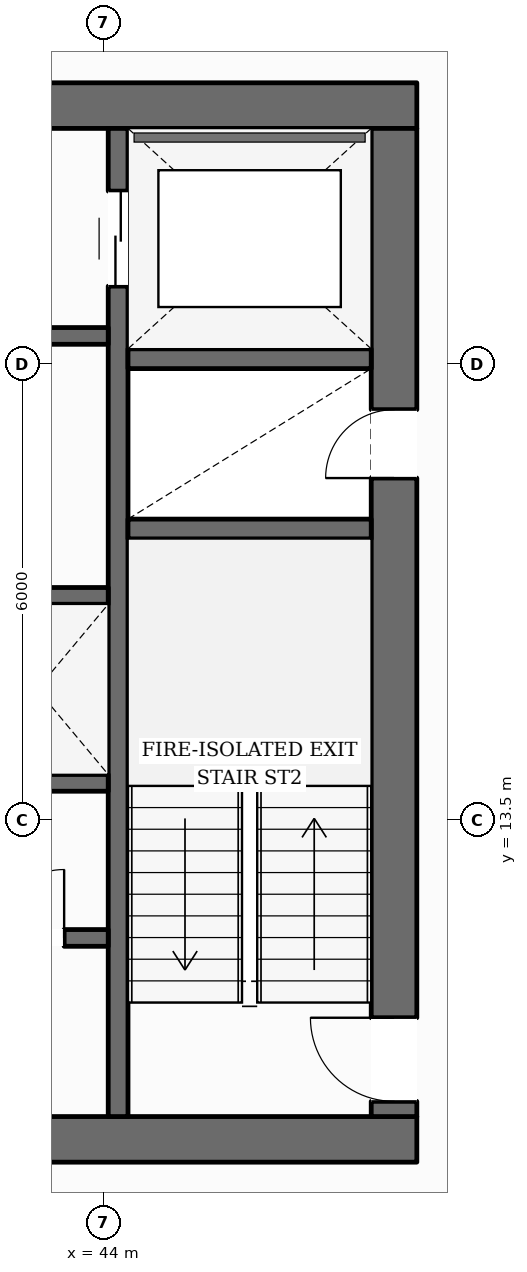
"""IFC4 building model, lengths in metres.
Left out: names, types, materials, properties, quantities, classifications, styles, units other than length and angle.
Written with IfcOpenShell. Run it as: python <this file> out.ifc"""

import sys

from ifc_helpers import new_model, si_unit, direction, frame, frame_2d, origin, place, context, subcontext, project, spatial, rectangle, extrude, element, fill, save


model = new_model("IFC4")
c1 = context("Model", 3, precision=1e-05, world=origin(), true_north=direction((0.0, 1.0)))
c2 = subcontext(c1, "Body", "Model", "MODEL_VIEW")
j1 = project(units=[si_unit("LENGTHUNIT", "METRE"), si_unit("PLANEANGLEUNIT", "RADIAN")], contexts=[c1])
p1 = place(None, origin())
s1 = spatial("IfcSite", under=j1, at=p1, CompositionType="ELEMENT")
p2 = place(p1, origin())
s2 = spatial("IfcBuilding", under=s1, at=p2, CompositionType="ELEMENT")
p3 = place(p2, frame((0.0, 0.0, 6.0)))
s3 = spatial("IfcBuildingStorey", under=s2, at=p3, CompositionType="ELEMENT", Elevation=6.0)
p4 = place(p3, frame((27.88, 9.3, 0.0), z_axis=(0.0, 0.0, 1.0), x_axis=(1.0, 0.0, 0.0)))
e1 = element("IfcWall", 1, at=p4, inside=s3, PredefinedType="SOLIDWALL", context=c2, shape_type="SweptSolid", body=[
    extrude(rectangle(XDim=20.24, YDim=0.6, at=frame_2d((10.12, 0.0))), origin(), (0.0, 0.0, 1.0), 3.59),
])
p5 = place(p4, frame((10.62, 0.0, 0.0)))
e2 = element("IfcOpeningElement", 2, at=p5, cuts=e1, PredefinedType="OPENING", context=c2, shape_type="SweptSolid", body=[
    extrude(rectangle(XDim=1.4, YDim=2.2, at=frame_2d((0.7, 1.1))), frame((0.0, 0.31, 0.0), z_axis=(0.0, -1.0, 0.0), x_axis=(1.0, 0.0, 0.0)), (0.0, 0.0, 1.0), 0.62),
])
p6 = place(p3, frame((27.88, 22.9, 0.0), z_axis=(0.0, 0.0, 1.0), x_axis=(1.0, 0.0, 0.0)))
e3 = element("IfcWall", 3, at=p6, inside=s3, PredefinedType="SOLIDWALL", context=c2, shape_type="SweptSolid", body=[
    extrude(rectangle(XDim=20.24, YDim=0.6, at=frame_2d((10.12, 0.0))), origin(), (0.0, 0.0, 1.0), 3.59),
])
p7 = place(p6, frame((6.395, 0.0, 0.0)))
e4 = element("IfcOpeningElement", 4, at=p7, cuts=e3, PredefinedType="OPENING", context=c2, shape_type="SweptSolid", body=[
    extrude(rectangle(XDim=1.05, YDim=2.15, at=frame_2d((0.525, 1.075))), frame((0.0, 0.31, 0.0), z_axis=(0.0, -1.0, 0.0), x_axis=(1.0, 0.0, 0.0)), (0.0, 0.0, 1.0), 0.62),
])
p8 = place(p6, frame((12.795, 0.0, 0.0)))
e5 = element("IfcOpeningElement", 5, at=p8, cuts=e3, PredefinedType="OPENING", context=c2, shape_type="SweptSolid", body=[
    extrude(rectangle(XDim=1.05, YDim=2.15, at=frame_2d((0.525, 1.075))), frame((0.0, 0.31, 0.0), z_axis=(0.0, -1.0, 0.0), x_axis=(1.0, 0.0, 0.0)), (0.0, 0.0, 1.0), 0.62),
])
p9 = place(p3, frame((47.82, 9.6, 0.0), z_axis=(0.0, 0.0, 1.0), x_axis=(0.0, 1.0, 0.0)))
e6 = element("IfcWall", 6, at=p9, inside=s3, PredefinedType="SOLIDWALL", context=c2, shape_type="SweptSolid", body=[
    extrude(rectangle(XDim=13.0, YDim=0.6, at=frame_2d((6.5, 0.0))), origin(), (0.0, 0.0, 1.0), 3.59),
])
p10 = place(p9, frame((0.2, 0.0, 0.0)))
e7 = element("IfcOpeningElement", 7, at=p10, cuts=e6, PredefinedType="OPENING", context=c2, shape_type="SweptSolid", body=[
    extrude(rectangle(XDim=1.1, YDim=2.15, at=frame_2d((0.55, 1.075))), frame((0.0, 0.31, 0.0), z_axis=(0.0, -1.0, 0.0), x_axis=(1.0, 0.0, 0.0)), (0.0, 0.0, 1.0), 0.62),
])
p11 = place(p9, frame((8.4, 0.0, 0.0)))
e8 = element("IfcOpeningElement", 8, at=p11, cuts=e6, PredefinedType="OPENING", context=c2, shape_type="SweptSolid", body=[
    extrude(rectangle(XDim=0.9, YDim=2.1, at=frame_2d((0.45, 1.05))), frame((0.0, 0.31, 0.0), z_axis=(0.0, -1.0, 0.0), x_axis=(1.0, 0.0, 0.0)), (0.0, 0.0, 1.0), 0.62),
])
p12 = place(p3, frame((44.19, 9.6, 0.0), z_axis=(0.0, 0.0, 1.0), x_axis=(0.0, 1.0, 0.0)))
e9 = element("IfcWall", 9, at=p12, inside=s3, PredefinedType="SHEAR", context=c2, shape_type="SweptSolid", body=[
    extrude(rectangle(XDim=13.0, YDim=0.26, at=frame_2d((6.5, 0.0))), origin(), (0.0, 0.0, 1.0), 3.59),
])
p13 = place(p12, frame((10.925, 0.0, 0.0)))
e10 = element("IfcOpeningElement", 10, at=p13, cuts=e9, PredefinedType="OPENING", context=c2, shape_type="SweptSolid", body=[
    extrude(rectangle(XDim=1.25, YDim=2.25, at=frame_2d((0.625, 1.125))), frame((0.0, 0.14, 0.0), z_axis=(0.0, -1.0, 0.0), x_axis=(1.0, 0.0, 0.0)), (0.0, 0.0, 1.0), 0.28),
])
for number, where, z_axis, x_axis in (
    (11, (44.32, 17.33, 0.0), (0.0, 0.0, 1.0), (1.0, 0.0, 0.0)),
    (12, (44.32, 19.57, 0.0), (0.0, 0.0, 1.0), (1.0, 0.0, 0.0)),
):
    element("IfcWall", number, at=place(p3, frame(where, z_axis=z_axis, x_axis=x_axis)), inside=s3, PredefinedType="SHEAR", context=c2, shape_type="SweptSolid", body=[
        extrude(rectangle(XDim=3.2, YDim=0.26, at=frame_2d((1.6, 0.0))), origin(), (0.0, 0.0, 1.0), 3.59),
    ])
p14 = place(p3, frame((31.94, 19.87, 0.0), z_axis=(0.0, 0.0, 1.0), x_axis=(1.0, 0.0, 0.0)))
e13 = element("IfcWall", 13, at=p14, inside=s3, PredefinedType="SOLIDWALL", context=c2, shape_type="SweptSolid", body=[
    extrude(rectangle(XDim=12.12, YDim=0.22, at=frame_2d((6.06, 0.0))), origin(), (0.0, 0.0, 1.0), 3.59),
])
p15 = place(p14, frame((6.3, 0.0, 0.0)))
e14 = element("IfcOpeningElement", 14, at=p15, cuts=e13, PredefinedType="OPENING", context=c2, shape_type="SweptSolid", body=[
    extrude(rectangle(XDim=1.1, YDim=2.15, at=frame_2d((0.55, 1.075))), frame((0.0, 0.12, 0.0), z_axis=(0.0, -1.0, 0.0), x_axis=(1.0, 0.0, 0.0)), (0.0, 0.0, 1.0), 0.24),
])
p16 = place(p14, frame((8.01, 0.0, 0.0)))
e15 = element("IfcOpeningElement", 15, at=p16, cuts=e13, PredefinedType="OPENING", context=c2, shape_type="SweptSolid", body=[
    extrude(rectangle(XDim=0.9, YDim=2.1, at=frame_2d((0.45, 1.05))), frame((0.0, 0.12, 0.0), z_axis=(0.0, -1.0, 0.0), x_axis=(1.0, 0.0, 0.0)), (0.0, 0.0, 1.0), 0.24),
])
p17 = place(p14, frame((10.21, 0.0, 0.0)))
e16 = element("IfcOpeningElement", 16, at=p17, cuts=e13, PredefinedType="OPENING", context=c2, shape_type="SweptSolid", body=[
    extrude(rectangle(XDim=0.9, YDim=2.1, at=frame_2d((0.45, 1.05))), frame((0.0, 0.12, 0.0), z_axis=(0.0, -1.0, 0.0), x_axis=(1.0, 0.0, 0.0)), (0.0, 0.0, 1.0), 0.24),
])
p18 = place(p3, frame((31.94, 16.45, 0.0), z_axis=(0.0, 0.0, 1.0), x_axis=(1.0, 0.0, 0.0)))
e17 = element("IfcWall", 17, at=p18, inside=s3, PredefinedType="SOLIDWALL", context=c2, shape_type="SweptSolid", body=[
    extrude(rectangle(XDim=12.12, YDim=0.22, at=frame_2d((6.06, 0.0))), origin(), (0.0, 0.0, 1.0), 3.59),
])
p19 = place(p3, frame((31.94, 13.99, 0.0), z_axis=(0.0, 0.0, 1.0), x_axis=(1.0, 0.0, 0.0)))
e18 = element("IfcWall", 18, at=p19, inside=s3, PredefinedType="SOLIDWALL", context=c2, shape_type="SweptSolid", body=[
    extrude(rectangle(XDim=12.12, YDim=0.22, at=frame_2d((6.06, 0.0))), origin(), (0.0, 0.0, 1.0), 3.59),
])
p20 = place(p19, frame((0.385, 0.0, 0.0)))
e19 = element("IfcOpeningElement", 19, at=p20, cuts=e18, PredefinedType="OPENING", context=c2, shape_type="SweptSolid", body=[
    extrude(rectangle(XDim=1.1, YDim=2.2, at=frame_2d((0.55, 1.1))), frame((0.0, 0.12, 0.0), z_axis=(0.0, -1.0, 0.0), x_axis=(1.0, 0.0, 0.0)), (0.0, 0.0, 1.0), 0.24),
])
p21 = place(p19, frame((2.435, 0.0, 0.0)))
e20 = element("IfcOpeningElement", 20, at=p21, cuts=e18, PredefinedType="OPENING", context=c2, shape_type="SweptSolid", body=[
    extrude(rectangle(XDim=1.1, YDim=2.2, at=frame_2d((0.55, 1.1))), frame((0.0, 0.12, 0.0), z_axis=(0.0, -1.0, 0.0), x_axis=(1.0, 0.0, 0.0)), (0.0, 0.0, 1.0), 0.24),
])
p22 = place(p19, frame((4.485, 0.0, 0.0)))
e21 = element("IfcOpeningElement", 21, at=p22, cuts=e18, PredefinedType="OPENING", context=c2, shape_type="SweptSolid", body=[
    extrude(rectangle(XDim=1.1, YDim=2.2, at=frame_2d((0.55, 1.1))), frame((0.0, 0.12, 0.0), z_axis=(0.0, -1.0, 0.0), x_axis=(1.0, 0.0, 0.0)), (0.0, 0.0, 1.0), 0.24),
])
p23 = place(p3, frame((40.28, 11.95, 0.0), z_axis=(0.0, 0.0, 1.0), x_axis=(1.0, 0.0, 0.0)))
e22 = element("IfcWall", 22, at=p23, inside=s3, PredefinedType="SOLIDWALL", context=c2, shape_type="SweptSolid", body=[
    extrude(rectangle(XDim=3.78, YDim=0.22, at=frame_2d((1.89, 0.0))), origin(), (0.0, 0.0, 1.0), 3.59),
])
p24 = place(p23, frame((0.47, 0.0, 0.0)))
e23 = element("IfcOpeningElement", 23, at=p24, cuts=e22, PredefinedType="OPENING", context=c2, shape_type="SweptSolid", body=[
    extrude(rectangle(XDim=0.9, YDim=2.1, at=frame_2d((0.45, 1.05))), frame((0.0, 0.12, 0.0), z_axis=(0.0, -1.0, 0.0), x_axis=(1.0, 0.0, 0.0)), (0.0, 0.0, 1.0), 0.24),
])
p25 = place(p23, frame((2.3, 0.0, 0.0)))
e24 = element("IfcOpeningElement", 24, at=p25, cuts=e22, PredefinedType="OPENING", context=c2, shape_type="SweptSolid", body=[
    extrude(rectangle(XDim=0.9, YDim=2.1, at=frame_2d((0.45, 1.05))), frame((0.0, 0.12, 0.0), z_axis=(0.0, -1.0, 0.0), x_axis=(1.0, 0.0, 0.0)), (0.0, 0.0, 1.0), 0.24),
])
p26 = place(p3, frame((46.14, 43.889, 0.0), z_axis=(0.0, 0.0, 1.0), x_axis=(0.497625280375, -0.86739211452, 0.0)))
e25 = element("IfcWall", 25, at=p26, inside=s3, PredefinedType="STANDARD", context=c2, shape_type="SweptSolid", body=[
    extrude(rectangle(XDim=32.921, YDim=0.38, at=frame_2d((16.46, 0.0))), origin(), (0.0, 0.0, 1.0), 2.97),
])
p27 = place(p26, frame((28.955, 0.0, 0.65)))
e26 = element("IfcOpeningElement", 26, at=p27, cuts=e25, PredefinedType="OPENING", context=c2, shape_type="SweptSolid", body=[
    extrude(rectangle(XDim=1.65, YDim=1.75, at=frame_2d((0.825, 0.875))), frame((0.0, 0.2, 0.0), z_axis=(0.0, -1.0, 0.0), x_axis=(1.0, 0.0, 0.0)), (0.0, 0.0, 1.0), 0.4),
])
p28 = place(p26, frame((23.628, 0.0, 0.65)))
e27 = element("IfcOpeningElement", 27, at=p28, cuts=e25, PredefinedType="OPENING", context=c2, shape_type="SweptSolid", body=[
    extrude(rectangle(XDim=1.65, YDim=1.75, at=frame_2d((0.825, 0.875))), frame((0.0, 0.2, 0.0), z_axis=(0.0, -1.0, 0.0), x_axis=(1.0, 0.0, 0.0)), (0.0, 0.0, 1.0), 0.4),
])
p29 = place(p26, frame((12.973, 0.0, 0.65)))
e28 = element("IfcOpeningElement", 28, at=p29, cuts=e25, PredefinedType="OPENING", context=c2, shape_type="SweptSolid", body=[
    extrude(rectangle(XDim=1.65, YDim=1.75, at=frame_2d((0.825, 0.875))), frame((0.0, 0.2, 0.0), z_axis=(0.0, -1.0, 0.0), x_axis=(1.0, 0.0, 0.0)), (0.0, 0.0, 1.0), 0.4),
])
p30 = place(p26, frame((7.646, 0.0, 0.65)))
e29 = element("IfcOpeningElement", 29, at=p30, cuts=e25, PredefinedType="OPENING", context=c2, shape_type="SweptSolid", body=[
    extrude(rectangle(XDim=1.65, YDim=1.75, at=frame_2d((0.825, 0.875))), frame((0.0, 0.2, 0.0), z_axis=(0.0, -1.0, 0.0), x_axis=(1.0, 0.0, 0.0)), (0.0, 0.0, 1.0), 0.4),
])
p31 = place(p26, frame((2.319, 0.0, 0.65)))
e30 = element("IfcOpeningElement", 30, at=p31, cuts=e25, PredefinedType="OPENING", context=c2, shape_type="SweptSolid", body=[
    extrude(rectangle(XDim=1.65, YDim=1.75, at=frame_2d((0.825, 0.875))), frame((0.0, 0.2, 0.0), z_axis=(0.0, -1.0, 0.0), x_axis=(1.0, 0.0, 0.0)), (0.0, 0.0, 1.0), 0.4),
])
p32 = place(p10, origin())
e31 = element("IfcDoor", 31, at=p32, inside=s3, OperationType="SINGLE_SWING_RIGHT", PredefinedType="DOOR", context=c2, shape_type="SweptSolid", body=[
    extrude(rectangle(XDim=1.1, YDim=2.15, at=frame_2d((0.55, 1.075))), frame((0.0, 0.025, 0.0), z_axis=(0.0, -1.0, 0.0), x_axis=(1.0, 0.0, 0.0)), (0.0, 0.0, 1.0), 0.05),
])
fill(e7, e31)
p33 = place(p11, origin())
e32 = element("IfcDoor", 32, at=p33, inside=s3, OperationType="SINGLE_SWING_LEFT", PredefinedType="DOOR", context=c2, shape_type="SweptSolid", body=[
    extrude(rectangle(XDim=0.9, YDim=2.1, at=frame_2d((0.45, 1.05))), frame((0.0, 0.025, 0.0), z_axis=(0.0, -1.0, 0.0), x_axis=(1.0, 0.0, 0.0)), (0.0, 0.0, 1.0), 0.05),
])
fill(e8, e32)
p34 = place(p13, origin())
e33 = element("IfcDoor", 33, at=p34, inside=s3, OperationType="DOUBLE_DOOR_SLIDING", PredefinedType="DOOR", context=c2, shape_type="SweptSolid", body=[
    extrude(rectangle(XDim=1.25, YDim=2.25, at=frame_2d((0.625, 1.125))), frame((0.0, 0.025, 0.0), z_axis=(0.0, -1.0, 0.0), x_axis=(1.0, 0.0, 0.0)), (0.0, 0.0, 1.0), 0.05),
])
fill(e10, e33)
p35 = place(p25, origin())
e34 = element("IfcDoor", 34, at=p35, inside=s3, OperationType="SINGLE_SWING_RIGHT", PredefinedType="DOOR", context=c2, shape_type="SweptSolid", body=[
    extrude(rectangle(XDim=0.9, YDim=2.1, at=frame_2d((0.45, 1.05))), frame((0.0, 0.025, 0.0), z_axis=(0.0, -1.0, 0.0), x_axis=(1.0, 0.0, 0.0)), (0.0, 0.0, 1.0), 0.05),
])
fill(e24, e34)
save(model, sys.argv[1])
